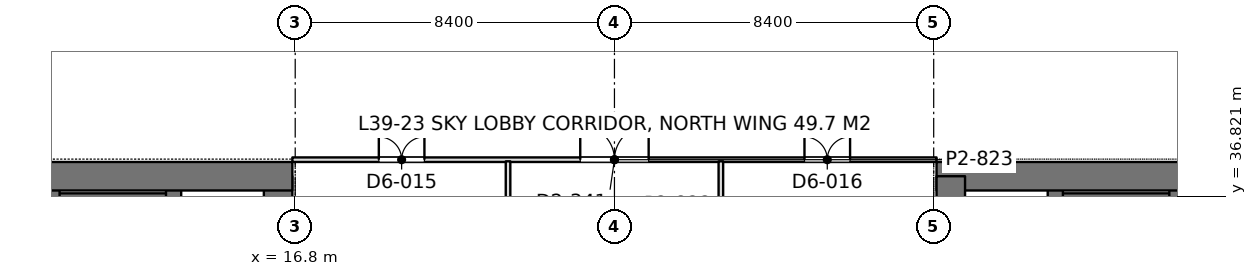
"""IFC4 building model, lengths in metres.
Left out: names, types, materials, properties, quantities, classifications, styles, units other than length and angle.
Written with IfcOpenShell. Run it as: python <this file> out.ifc"""

import sys

from ifc_helpers import new_model, si_unit, direction, frame, frame_2d, origin, place, context, subcontext, project, spatial, rectangle, extrude, element, fill, save


model = new_model("IFC4")
c1 = context("Model", 3, precision=1e-05, world=origin(), true_north=direction((0.0, 1.0)))
c2 = subcontext(c1, "Body", "Model", "MODEL_VIEW")
j1 = project(units=[si_unit("LENGTHUNIT", "METRE"), si_unit("PLANEANGLEUNIT", "RADIAN")], contexts=[c1])
p1 = place(None, origin())
s1 = spatial("IfcSite", under=j1, at=p1, CompositionType="ELEMENT")
p2 = place(p1, origin())
s2 = spatial("IfcBuilding", under=s1, at=p2, CompositionType="ELEMENT")
p3 = place(p2, frame((0.0, 0.0, 173.4)))
s3 = spatial("IfcBuildingStorey", under=s2, at=p3, CompositionType="ELEMENT", Elevation=173.4)
p4 = place(p3, frame((-1.125, 37.35, 0.0), z_axis=(0.0, 0.0, 1.0), x_axis=(1.0, 0.0, 0.0)))
e1 = element("IfcWall", 1, at=p4, inside=s3, PredefinedType="SHEAR", context=c2, shape_type="SweptSolid", body=[
    extrude(rectangle(XDim=17.85, YDim=0.75, at=frame_2d((8.925, 0.0))), origin(), (0.0, 0.0, 1.0), 4.2),
])
p5 = place(p4, frame((8.875, 0.0, 0.0)))
e2 = element("IfcOpeningElement", 2, at=p5, cuts=e1, PredefinedType="OPENING", context=c2, shape_type="SweptSolid", body=[
    extrude(rectangle(XDim=1.8, YDim=2.4, at=frame_2d((0.9, 1.2))), frame((0.0, 0.385, 0.0), z_axis=(0.0, -1.0, 0.0), x_axis=(1.0, 0.0, 0.0)), (0.0, 0.0, 1.0), 0.77),
])
p6 = place(p3, frame((16.35, 27.8, 0.0), z_axis=(0.0, 0.0, 1.0), x_axis=(0.0, 1.0, 0.0)))
e3 = element("IfcWall", 3, at=p6, inside=s3, PredefinedType="SHEAR", context=c2, shape_type="SweptSolid", body=[
    extrude(rectangle(XDim=9.55, YDim=0.75, at=frame_2d((4.775, 0.0))), origin(), (0.0, 0.0, 1.0), 4.2),
])
p7 = place(p3, frame((10.4, 13.05, 0.0), z_axis=(0.0, 0.0, 1.0), x_axis=(0.0, 1.0, 0.0)))
e4 = element("IfcWall", 4, at=p7, inside=s3, PredefinedType="SHEAR", context=c2, shape_type="SweptSolid", body=[
    extrude(rectangle(XDim=24.3, YDim=0.4, at=frame_2d((12.15, 0.0))), origin(), (0.0, 0.0, 1.0), 4.2),
])
p8 = place(p7, frame((15.75, 0.0, 0.0)))
e5 = element("IfcOpeningElement", 5, at=p8, cuts=e4, PredefinedType="OPENING", context=c2, shape_type="SweptSolid", body=[
    extrude(rectangle(XDim=1.1, YDim=2.2, at=frame_2d((0.55, 1.1))), frame((0.0, 0.21, 0.0), z_axis=(0.0, -1.0, 0.0), x_axis=(1.0, 0.0, 0.0)), (0.0, 0.0, 1.0), 0.42),
])
p9 = place(p7, frame((18.6, 0.0, 0.0)))
e6 = element("IfcOpeningElement", 6, at=p9, cuts=e4, PredefinedType="OPENING", context=c2, shape_type="SweptSolid", body=[
    extrude(rectangle(XDim=1.1, YDim=2.2, at=frame_2d((0.55, 1.1))), frame((0.0, 0.21, 0.0), z_axis=(0.0, -1.0, 0.0), x_axis=(1.0, 0.0, 0.0)), (0.0, 0.0, 1.0), 0.42),
])
p10 = place(p7, frame((21.45, 0.0, 0.0)))
e7 = element("IfcOpeningElement", 7, at=p10, cuts=e4, PredefinedType="OPENING", context=c2, shape_type="SweptSolid", body=[
    extrude(rectangle(XDim=1.1, YDim=2.2, at=frame_2d((0.55, 1.1))), frame((0.0, 0.21, 0.0), z_axis=(0.0, -1.0, 0.0), x_axis=(1.0, 0.0, 0.0)), (0.0, 0.0, 1.0), 0.42),
])
p11 = place(p7, frame((6.05, 0.0, 0.0)))
e8 = element("IfcOpeningElement", 8, at=p11, cuts=e4, PredefinedType="OPENING", context=c2, shape_type="SweptSolid", body=[
    extrude(rectangle(XDim=1.8, YDim=2.4, at=frame_2d((0.9, 1.2))), frame((0.0, 0.21, 0.0), z_axis=(0.0, -1.0, 0.0), x_axis=(1.0, 0.0, 0.0)), (0.0, 0.0, 1.0), 0.42),
])
p12 = place(p7, frame((11.25, 0.0, 0.0)))
e9 = element("IfcOpeningElement", 9, at=p12, cuts=e4, PredefinedType="OPENING", context=c2, shape_type="SweptSolid", body=[
    extrude(rectangle(XDim=1.8, YDim=2.4, at=frame_2d((0.9, 1.2))), frame((0.0, 0.21, 0.0), z_axis=(0.0, -1.0, 0.0), x_axis=(1.0, 0.0, 0.0)), (0.0, 0.0, 1.0), 0.42),
])
p13 = place(p3, frame((13.6, 27.925, 0.0), z_axis=(0.0, 0.0, 1.0), x_axis=(0.0, 1.0, 0.0)))
e10 = element("IfcWall", 10, at=p13, inside=s3, PredefinedType="SHEAR", context=c2, shape_type="SweptSolid", body=[
    extrude(rectangle(XDim=9.425, YDim=0.4, at=frame_2d((4.712, 0.0))), origin(), (0.0, 0.0, 1.0), 4.2),
])
p14 = place(p3, frame((10.4, 36.625, 0.0), z_axis=(0.0, 0.0, 1.0), x_axis=(1.0, 0.0, 0.0)))
e11 = element("IfcWall", 11, at=p14, inside=s3, PredefinedType="SHEAR", context=c2, shape_type="SweptSolid", body=[
    extrude(rectangle(XDim=3.2, YDim=0.55, at=frame_2d((1.6, 0.0))), origin(), (0.0, 0.0, 1.0), 4.2),
])
p15 = place(p3, frame((33.675, 37.35, 0.0), z_axis=(0.0, 0.0, 1.0), x_axis=(1.0, 0.0, 0.0)))
e12 = element("IfcWall", 12, at=p15, inside=s3, PredefinedType="SHEAR", context=c2, shape_type="SweptSolid", body=[
    extrude(rectangle(XDim=17.85, YDim=0.75, at=frame_2d((8.925, 0.0))), origin(), (0.0, 0.0, 1.0), 4.2),
])
p16 = place(p15, frame((7.175, 0.0, 0.0)))
e13 = element("IfcOpeningElement", 13, at=p16, cuts=e12, PredefinedType="OPENING", context=c2, shape_type="SweptSolid", body=[
    extrude(rectangle(XDim=1.8, YDim=2.4, at=frame_2d((0.9, 1.2))), frame((0.0, 0.385, 0.0), z_axis=(0.0, -1.0, 0.0), x_axis=(1.0, 0.0, 0.0)), (0.0, 0.0, 1.0), 0.77),
])
p17 = place(p3, frame((34.05, 27.8, 0.0), z_axis=(0.0, 0.0, 1.0), x_axis=(0.0, 1.0, 0.0)))
e14 = element("IfcWall", 14, at=p17, inside=s3, PredefinedType="SHEAR", context=c2, shape_type="SweptSolid", body=[
    extrude(rectangle(XDim=9.55, YDim=0.75, at=frame_2d((4.775, 0.0))), origin(), (0.0, 0.0, 1.0), 4.2),
])
p18 = place(p3, frame((40.0, 13.05, 0.0), z_axis=(0.0, 0.0, 1.0), x_axis=(0.0, 1.0, 0.0)))
e15 = element("IfcWall", 15, at=p18, inside=s3, PredefinedType="SHEAR", context=c2, shape_type="SweptSolid", body=[
    extrude(rectangle(XDim=24.3, YDim=0.4, at=frame_2d((12.15, 0.0))), origin(), (0.0, 0.0, 1.0), 4.2),
])
p19 = place(p18, frame((15.75, 0.0, 0.0)))
e16 = element("IfcOpeningElement", 16, at=p19, cuts=e15, PredefinedType="OPENING", context=c2, shape_type="SweptSolid", body=[
    extrude(rectangle(XDim=1.1, YDim=2.2, at=frame_2d((0.55, 1.1))), frame((0.0, 0.21, 0.0), z_axis=(0.0, -1.0, 0.0), x_axis=(1.0, 0.0, 0.0)), (0.0, 0.0, 1.0), 0.42),
])
p20 = place(p18, frame((18.6, 0.0, 0.0)))
e17 = element("IfcOpeningElement", 17, at=p20, cuts=e15, PredefinedType="OPENING", context=c2, shape_type="SweptSolid", body=[
    extrude(rectangle(XDim=1.1, YDim=2.2, at=frame_2d((0.55, 1.1))), frame((0.0, 0.21, 0.0), z_axis=(0.0, -1.0, 0.0), x_axis=(1.0, 0.0, 0.0)), (0.0, 0.0, 1.0), 0.42),
])
p21 = place(p18, frame((21.45, 0.0, 0.0)))
e18 = element("IfcOpeningElement", 18, at=p21, cuts=e15, PredefinedType="OPENING", context=c2, shape_type="SweptSolid", body=[
    extrude(rectangle(XDim=1.1, YDim=2.2, at=frame_2d((0.55, 1.1))), frame((0.0, 0.21, 0.0), z_axis=(0.0, -1.0, 0.0), x_axis=(1.0, 0.0, 0.0)), (0.0, 0.0, 1.0), 0.42),
])
p22 = place(p18, frame((6.05, 0.0, 0.0)))
e19 = element("IfcOpeningElement", 19, at=p22, cuts=e15, PredefinedType="OPENING", context=c2, shape_type="SweptSolid", body=[
    extrude(rectangle(XDim=1.8, YDim=2.4, at=frame_2d((0.9, 1.2))), frame((0.0, 0.21, 0.0), z_axis=(0.0, -1.0, 0.0), x_axis=(1.0, 0.0, 0.0)), (0.0, 0.0, 1.0), 0.42),
])
p23 = place(p18, frame((11.25, 0.0, 0.0)))
e20 = element("IfcOpeningElement", 20, at=p23, cuts=e15, PredefinedType="OPENING", context=c2, shape_type="SweptSolid", body=[
    extrude(rectangle(XDim=1.8, YDim=2.4, at=frame_2d((0.9, 1.2))), frame((0.0, 0.21, 0.0), z_axis=(0.0, -1.0, 0.0), x_axis=(1.0, 0.0, 0.0)), (0.0, 0.0, 1.0), 0.42),
])
p24 = place(p3, frame((36.8, 27.925, 0.0), z_axis=(0.0, 0.0, 1.0), x_axis=(0.0, 1.0, 0.0)))
e21 = element("IfcWall", 21, at=p24, inside=s3, PredefinedType="SHEAR", context=c2, shape_type="SweptSolid", body=[
    extrude(rectangle(XDim=9.425, YDim=0.4, at=frame_2d((4.712, 0.0))), origin(), (0.0, 0.0, 1.0), 4.2),
])
p25 = place(p3, frame((40.0, 36.625, 0.0), z_axis=(0.0, 0.0, 1.0), x_axis=(-1.0, 0.0, 0.0)))
e22 = element("IfcWall", 22, at=p25, inside=s3, PredefinedType="SHEAR", context=c2, shape_type="SweptSolid", body=[
    extrude(rectangle(XDim=3.2, YDim=0.55, at=frame_2d((1.6, 0.0))), origin(), (0.0, 0.0, 1.0), 4.2),
])
p26 = place(p3, frame((16.725, 37.785, 0.0), z_axis=(0.0, 0.0, 1.0), x_axis=(1.0, 0.0, 0.0)))
e23 = element("IfcWall", 23, at=p26, inside=s3, PredefinedType="PARTITIONING", context=c2, shape_type="SweptSolid", body=[
    extrude(rectangle(XDim=16.95, YDim=0.12, at=frame_2d((8.475, 0.0))), origin(), (0.0, 0.0, 1.0), 3.55),
])
p27 = place(p26, frame((2.275, 0.0, 0.0)))
e24 = element("IfcOpeningElement", 24, at=p27, cuts=e23, PredefinedType="OPENING", context=c2, shape_type="SweptSolid", body=[
    extrude(rectangle(XDim=1.2, YDim=2.2, at=frame_2d((0.6, 1.1))), frame((0.0, 0.07, 0.0), z_axis=(0.0, -1.0, 0.0), x_axis=(1.0, 0.0, 0.0)), (0.0, 0.0, 1.0), 0.14),
])
p28 = place(p26, frame((7.575, 0.0, 0.0)))
e25 = element("IfcOpeningElement", 25, at=p28, cuts=e23, PredefinedType="OPENING", context=c2, shape_type="SweptSolid", body=[
    extrude(rectangle(XDim=1.8, YDim=2.2, at=frame_2d((0.9, 1.1))), frame((0.0, 0.07, 0.0), z_axis=(0.0, -1.0, 0.0), x_axis=(1.0, 0.0, 0.0)), (0.0, 0.0, 1.0), 0.14),
])
p29 = place(p26, frame((13.475, 0.0, 0.0)))
e26 = element("IfcOpeningElement", 26, at=p29, cuts=e23, PredefinedType="OPENING", context=c2, shape_type="SweptSolid", body=[
    extrude(rectangle(XDim=1.2, YDim=2.2, at=frame_2d((0.6, 1.1))), frame((0.0, 0.07, 0.0), z_axis=(0.0, -1.0, 0.0), x_axis=(1.0, 0.0, 0.0)), (0.0, 0.0, 1.0), 0.14),
])
for number, where, z_axis, x_axis in (
    (27, (22.4, 33.208, 0.0), (0.0, 0.0, 1.0), (0.0, 1.0, 0.0)),
    (28, (28.0, 33.208, 0.0), (0.0, 0.0, 1.0), (0.0, 1.0, 0.0)),
):
    element("IfcWall", number, at=place(p3, frame(where, z_axis=z_axis, x_axis=x_axis)), inside=s3, PredefinedType="PARTITIONING", context=c2, shape_type="SweptSolid", body=[
        extrude(rectangle(XDim=4.534, YDim=0.12, at=frame_2d((2.267, 0.0))), origin(), (0.0, 0.0, 1.0), 3.2),
    ])
p30 = place(p27, origin())
e29 = element("IfcDoor", 29, at=p30, inside=s3, OperationType="DOUBLE_DOOR_SINGLE_SWING_OPPOSITE_LEFT", PredefinedType="DOOR", context=c2, shape_type="SweptSolid", body=[
    extrude(rectangle(XDim=1.2, YDim=2.2, at=frame_2d((0.6, 1.1))), frame((0.0, 0.025, 0.0), z_axis=(0.0, -1.0, 0.0), x_axis=(1.0, 0.0, 0.0)), (0.0, 0.0, 1.0), 0.05),
])
fill(e24, e29)
p31 = place(p28, origin())
e30 = element("IfcDoor", 30, at=p31, inside=s3, OperationType="DOUBLE_DOOR_SINGLE_SWING", PredefinedType="DOOR", context=c2, shape_type="SweptSolid", body=[
    extrude(rectangle(XDim=1.8, YDim=2.2, at=frame_2d((0.9, 1.1))), frame((0.0, 0.025, 0.0), z_axis=(0.0, -1.0, 0.0), x_axis=(1.0, 0.0, 0.0)), (0.0, 0.0, 1.0), 0.05),
])
fill(e25, e30)
p32 = place(p29, origin())
e31 = element("IfcDoor", 31, at=p32, inside=s3, OperationType="DOUBLE_DOOR_SINGLE_SWING_OPPOSITE_LEFT", PredefinedType="DOOR", context=c2, shape_type="SweptSolid", body=[
    extrude(rectangle(XDim=1.2, YDim=2.2, at=frame_2d((0.6, 1.1))), frame((0.0, 0.025, 0.0), z_axis=(0.0, -1.0, 0.0), x_axis=(1.0, 0.0, 0.0)), (0.0, 0.0, 1.0), 0.05),
])
fill(e26, e31)
save(model, sys.argv[1])
